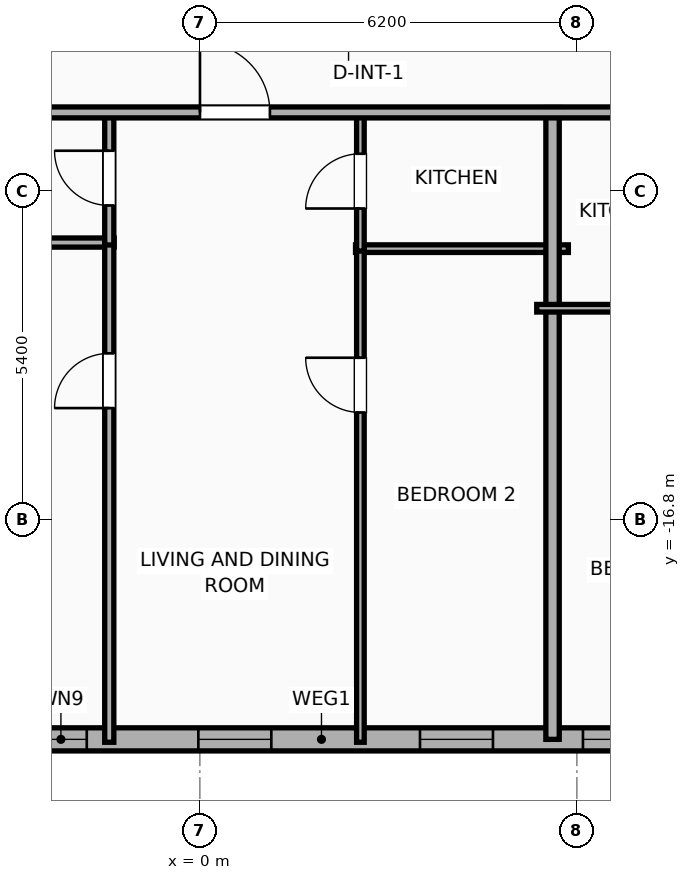
"""IFC4 building model, lengths in metres.
Left out: names, types, materials, properties, quantities, classifications, styles, units other than length and angle.
Written with IfcOpenShell. Run it as: python <this file> out.ifc"""

import sys

from ifc_helpers import new_model, si_unit, direction, frame, frame_2d, origin, place, context, subcontext, project, spatial, rectangle, extrude, element, fill, save


model = new_model("IFC4")
c1 = context("Model", 3, precision=1e-05, world=origin(), true_north=direction((0.0, 1.0)))
c2 = subcontext(c1, "Body", "Model", "MODEL_VIEW")
j1 = project(units=[si_unit("LENGTHUNIT", "METRE"), si_unit("PLANEANGLEUNIT", "RADIAN")], contexts=[c1])
p1 = place(None, origin())
s1 = spatial("IfcSite", under=j1, at=p1, CompositionType="ELEMENT")
p2 = place(p1, origin())
s2 = spatial("IfcBuilding", under=s1, at=p2, CompositionType="ELEMENT")
p3 = place(p2, frame((0.0, 0.0, 97.5)))
s3 = spatial("IfcBuildingStorey", under=s2, at=p3, CompositionType="ELEMENT", Elevation=97.5)
p4 = place(p3, frame((29.381, -20.41, 0.0), z_axis=(0.0, 0.0, 1.0), x_axis=(-1.0, 0.0, 0.0)))
e1 = element("IfcWall", 1, at=p4, inside=s3, PredefinedType="ELEMENTEDWALL", context=c2, shape_type="SweptSolid", body=[
    extrude(rectangle(XDim=54.763, YDim=0.38, at=frame_2d((27.381, 0.0))), origin(), (0.0, 0.0, 1.0), 3.65),
])
p5 = place(p4, frame((6.495, 0.0, 0.75)))
e2 = element("IfcOpeningElement", 2, at=p5, cuts=e1, PredefinedType="OPENING", context=c2, shape_type="SweptSolid", body=[
    extrude(rectangle(XDim=2.4, YDim=2.1, at=frame_2d((1.2, 1.05))), frame((0.0, 0.2, 0.0), z_axis=(0.0, -1.0, 0.0), x_axis=(1.0, 0.0, 0.0)), (0.0, 0.0, 1.0), 0.4),
])
p6 = place(p4, frame((17.686, 0.0, 0.75)))
e3 = element("IfcOpeningElement", 3, at=p6, cuts=e1, PredefinedType="OPENING", context=c2, shape_type="SweptSolid", body=[
    extrude(rectangle(XDim=2.4, YDim=2.1, at=frame_2d((1.2, 1.05))), frame((0.0, 0.2, 0.0), z_axis=(0.0, -1.0, 0.0), x_axis=(1.0, 0.0, 0.0)), (0.0, 0.0, 1.0), 0.4),
])
p7 = place(p4, frame((34.677, 0.0, 0.75)))
e4 = element("IfcOpeningElement", 4, at=p7, cuts=e1, PredefinedType="OPENING", context=c2, shape_type="SweptSolid", body=[
    extrude(rectangle(XDim=2.4, YDim=2.1, at=frame_2d((1.2, 1.05))), frame((0.0, 0.2, 0.0), z_axis=(0.0, -1.0, 0.0), x_axis=(1.0, 0.0, 0.0)), (0.0, 0.0, 1.0), 0.4),
])
p8 = place(p4, frame((45.867, 0.0, 0.75)))
e5 = element("IfcOpeningElement", 5, at=p8, cuts=e1, PredefinedType="OPENING", context=c2, shape_type="SweptSolid", body=[
    extrude(rectangle(XDim=2.4, YDim=2.1, at=frame_2d((1.2, 1.05))), frame((0.0, 0.2, 0.0), z_axis=(0.0, -1.0, 0.0), x_axis=(1.0, 0.0, 0.0)), (0.0, 0.0, 1.0), 0.4),
])
p9 = place(p4, frame((52.281, 0.0, 0.75)))
e6 = element("IfcOpeningElement", 6, at=p9, cuts=e1, PredefinedType="OPENING", context=c2, shape_type="SweptSolid", body=[
    extrude(rectangle(XDim=1.2, YDim=2.05, at=frame_2d((0.6, 1.025))), frame((0.0, 0.2, 0.0), z_axis=(0.0, -1.0, 0.0), x_axis=(1.0, 0.0, 0.0)), (0.0, 0.0, 1.0), 0.4),
])
p10 = place(p4, frame((49.641, 0.0, 0.75)))
e7 = element("IfcOpeningElement", 7, at=p10, cuts=e1, PredefinedType="OPENING", context=c2, shape_type="SweptSolid", body=[
    extrude(rectangle(XDim=1.2, YDim=2.05, at=frame_2d((0.6, 1.025))), frame((0.0, 0.2, 0.0), z_axis=(0.0, -1.0, 0.0), x_axis=(1.0, 0.0, 0.0)), (0.0, 0.0, 1.0), 0.4),
])
p11 = place(p4, frame((39.543, 0.0, 0.75)))
e8 = element("IfcOpeningElement", 8, at=p11, cuts=e1, PredefinedType="OPENING", context=c2, shape_type="SweptSolid", body=[
    extrude(rectangle(XDim=1.2, YDim=2.05, at=frame_2d((0.6, 1.025))), frame((0.0, 0.2, 0.0), z_axis=(0.0, -1.0, 0.0), x_axis=(1.0, 0.0, 0.0)), (0.0, 0.0, 1.0), 0.4),
])
p12 = place(p4, frame((44.538, 0.0, 0.75)))
e9 = element("IfcOpeningElement", 9, at=p12, cuts=e1, PredefinedType="OPENING", context=c2, shape_type="SweptSolid", body=[
    extrude(rectangle(XDim=0.52, YDim=2.05, at=frame_2d((0.26, 1.025))), frame((0.0, 0.2, 0.0), z_axis=(0.0, -1.0, 0.0), x_axis=(1.0, 0.0, 0.0)), (0.0, 0.0, 1.0), 0.4),
])
p13 = place(p4, frame((28.206, 0.0, 0.75)))
e10 = element("IfcOpeningElement", 10, at=p13, cuts=e1, PredefinedType="OPENING", context=c2, shape_type="SweptSolid", body=[
    extrude(rectangle(XDim=1.2, YDim=2.05, at=frame_2d((0.6, 1.025))), frame((0.0, 0.2, 0.0), z_axis=(0.0, -1.0, 0.0), x_axis=(1.0, 0.0, 0.0)), (0.0, 0.0, 1.0), 0.4),
])
p14 = place(p4, frame((31.241, 0.0, 0.75)))
e11 = element("IfcOpeningElement", 11, at=p14, cuts=e1, PredefinedType="OPENING", context=c2, shape_type="SweptSolid", body=[
    extrude(rectangle(XDim=0.85, YDim=2.05, at=frame_2d((0.425, 1.025))), frame((0.0, 0.2, 0.0), z_axis=(0.0, -1.0, 0.0), x_axis=(1.0, 0.0, 0.0)), (0.0, 0.0, 1.0), 0.4),
])
p15 = place(p4, frame((24.561, 0.0, 0.75)))
e12 = element("IfcOpeningElement", 12, at=p15, cuts=e1, PredefinedType="OPENING", context=c2, shape_type="SweptSolid", body=[
    extrude(rectangle(XDim=1.2, YDim=2.05, at=frame_2d((0.6, 1.025))), frame((0.0, 0.2, 0.0), z_axis=(0.0, -1.0, 0.0), x_axis=(1.0, 0.0, 0.0)), (0.0, 0.0, 1.0), 0.4),
])
p16 = place(p4, frame((22.561, 0.0, 0.75)))
e13 = element("IfcOpeningElement", 13, at=p16, cuts=e1, PredefinedType="OPENING", context=c2, shape_type="SweptSolid", body=[
    extrude(rectangle(XDim=0.52, YDim=2.05, at=frame_2d((0.26, 1.025))), frame((0.0, 0.2, 0.0), z_axis=(0.0, -1.0, 0.0), x_axis=(1.0, 0.0, 0.0)), (0.0, 0.0, 1.0), 0.4),
])
p17 = place(p4, frame((13.886, 0.0, 0.75)))
e14 = element("IfcOpeningElement", 14, at=p17, cuts=e1, PredefinedType="OPENING", context=c2, shape_type="SweptSolid", body=[
    extrude(rectangle(XDim=1.2, YDim=2.05, at=frame_2d((0.6, 1.025))), frame((0.0, 0.2, 0.0), z_axis=(0.0, -1.0, 0.0), x_axis=(1.0, 0.0, 0.0)), (0.0, 0.0, 1.0), 0.4),
])
p18 = place(p4, frame((11.694, 0.0, 0.75)))
e15 = element("IfcOpeningElement", 15, at=p18, cuts=e1, PredefinedType="OPENING", context=c2, shape_type="SweptSolid", body=[
    extrude(rectangle(XDim=0.85, YDim=2.05, at=frame_2d((0.425, 1.025))), frame((0.0, 0.2, 0.0), z_axis=(0.0, -1.0, 0.0), x_axis=(1.0, 0.0, 0.0)), (0.0, 0.0, 1.0), 0.4),
])
p19 = place(p4, frame((3.286, 0.0, 0.75)))
e16 = element("IfcOpeningElement", 16, at=p19, cuts=e1, PredefinedType="OPENING", context=c2, shape_type="SweptSolid", body=[
    extrude(rectangle(XDim=1.2, YDim=2.05, at=frame_2d((0.6, 1.025))), frame((0.0, 0.2, 0.0), z_axis=(0.0, -1.0, 0.0), x_axis=(1.0, 0.0, 0.0)), (0.0, 0.0, 1.0), 0.4),
])
p20 = place(p4, frame((0.816, 0.0, 0.75)))
e17 = element("IfcOpeningElement", 17, at=p20, cuts=e1, PredefinedType="OPENING", context=c2, shape_type="SweptSolid", body=[
    extrude(rectangle(XDim=1.2, YDim=2.05, at=frame_2d((0.6, 1.025))), frame((0.0, 0.2, 0.0), z_axis=(0.0, -1.0, 0.0), x_axis=(1.0, 0.0, 0.0)), (0.0, 0.0, 1.0), 0.4),
])
p21 = place(p3, frame((-5.26, -12.24, 0.0), z_axis=(0.0, 0.0, 1.0), x_axis=(1.0, 0.0, 0.0)))
e18 = element("IfcWall", 18, at=p21, inside=s3, PredefinedType="PLUMBINGWALL", context=c2, shape_type="SweptSolid", body=[
    extrude(rectangle(XDim=3.85, YDim=0.15, at=frame_2d((1.925, 0.0))), origin(), (0.0, 0.0, 1.0), 3.65),
])
p22 = place(p3, frame((2.56, -12.34, 0.0), z_axis=(0.0, 0.0, 1.0), x_axis=(1.0, 0.0, 0.0)))
e19 = element("IfcWall", 19, at=p22, inside=s3, PredefinedType="PARTITIONING", context=c2, shape_type="SweptSolid", body=[
    extrude(rectangle(XDim=3.5, YDim=0.125, at=frame_2d((1.75, 0.0))), origin(), (0.0, 0.0, 1.0), 3.65),
])
p23 = place(p3, frame((-1.49, -20.458, 0.0), z_axis=(0.0, 0.0, 1.0), x_axis=(0.0, 1.0, 0.0)))
e20 = element("IfcWall", 20, at=p23, inside=s3, PredefinedType="PLUMBINGWALL", context=c2, shape_type="SweptSolid", body=[
    extrude(rectangle(XDim=8.258, YDim=0.15, at=frame_2d((4.129, 0.0))), origin(), (0.0, 0.0, 1.0), 3.65),
])
p24 = place(p23, frame((5.496, 0.0, 0.0)))
e21 = element("IfcOpeningElement", 21, at=p24, cuts=e20, PredefinedType="OPENING", context=c2, shape_type="SweptSolid", body=[
    extrude(rectangle(XDim=0.9, YDim=2.05, at=frame_2d((0.45, 1.025))), frame((0.0, 0.085, 0.0), z_axis=(0.0, -1.0, 0.0), x_axis=(1.0, 0.0, 0.0)), (0.0, 0.0, 1.0), 0.17),
])
p25 = place(p3, frame((-1.49, -12.28, 0.0), z_axis=(0.0, 0.0, 1.0), x_axis=(0.0, 1.0, 0.0)))
e22 = element("IfcWall", 22, at=p25, inside=s3, PredefinedType="PLUMBINGWALL", context=c2, shape_type="SweptSolid", body=[
    extrude(rectangle(XDim=2.2, YDim=0.15, at=frame_2d((1.1, 0.0))), origin(), (0.0, 0.0, 1.0), 3.65),
])
p26 = place(p25, frame((0.65, 0.0, 0.0)))
e23 = element("IfcOpeningElement", 23, at=p26, cuts=e22, PredefinedType="OPENING", context=c2, shape_type="SweptSolid", body=[
    extrude(rectangle(XDim=0.9, YDim=2.05, at=frame_2d((0.45, 1.025))), frame((0.0, 0.085, 0.0), z_axis=(0.0, -1.0, 0.0), x_axis=(1.0, 0.0, 0.0)), (0.0, 0.0, 1.0), 0.17),
])
p27 = place(p3, frame((2.64, -20.458, 0.0), z_axis=(0.0, 0.0, 1.0), x_axis=(0.0, 1.0, 0.0)))
e24 = element("IfcWall", 24, at=p27, inside=s3, PredefinedType="PARTITIONING", context=c2, shape_type="SweptSolid", body=[
    extrude(rectangle(XDim=8.157, YDim=0.125, at=frame_2d((4.079, 0.0))), origin(), (0.0, 0.0, 1.0), 3.65),
])
p28 = place(p27, frame((5.424, 0.0, 0.0)))
e25 = element("IfcOpeningElement", 25, at=p28, cuts=e24, PredefinedType="OPENING", context=c2, shape_type="SweptSolid", body=[
    extrude(rectangle(XDim=0.9, YDim=2.05, at=frame_2d((0.45, 1.025))), frame((0.0, 0.073, 0.0), z_axis=(0.0, -1.0, 0.0), x_axis=(1.0, 0.0, 0.0)), (0.0, 0.0, 1.0), 0.145),
])
p29 = place(p3, frame((2.64, -12.38, 0.0), z_axis=(0.0, 0.0, 1.0), x_axis=(0.0, 1.0, 0.0)))
e26 = element("IfcWall", 26, at=p29, inside=s3, PredefinedType="PARTITIONING", context=c2, shape_type="SweptSolid", body=[
    extrude(rectangle(XDim=2.3, YDim=0.125, at=frame_2d((1.15, 0.0))), origin(), (0.0, 0.0, 1.0), 3.65),
])
p30 = place(p29, frame((0.7, 0.0, 0.0)))
e27 = element("IfcOpeningElement", 27, at=p30, cuts=e26, PredefinedType="OPENING", context=c2, shape_type="SweptSolid", body=[
    extrude(rectangle(XDim=0.9, YDim=2.05, at=frame_2d((0.45, 1.025))), frame((0.0, 0.073, 0.0), z_axis=(0.0, -1.0, 0.0), x_axis=(1.0, 0.0, 0.0)), (0.0, 0.0, 1.0), 0.145),
])
p31 = place(p3, frame((5.8, -20.41, 0.0), z_axis=(0.0, 0.0, 1.0), x_axis=(0.0, 1.0, 0.0)))
e28 = element("IfcWall", 28, at=p31, inside=s3, PredefinedType="PARTITIONING", context=c2, shape_type="SweptSolid", body=[
    extrude(rectangle(XDim=10.39, YDim=0.22, at=frame_2d((5.195, 0.0))), origin(), (0.0, 0.0, 1.0), 3.04),
])
p32 = place(p3, frame((5.54, -13.32, 0.0), z_axis=(0.0, 0.0, 1.0), x_axis=(1.0, 0.0, 0.0)))
e29 = element("IfcWall", 29, at=p32, inside=s3, PredefinedType="PARTITIONING", context=c2, shape_type="SweptSolid", body=[
    extrude(rectangle(XDim=3.58, YDim=0.125, at=frame_2d((1.79, 0.0))), origin(), (0.0, 0.0, 1.0), 3.65),
])
p33 = place(p3, frame((-29.21, -10.1, 0.0), z_axis=(0.0, 0.0, 1.0), x_axis=(1.0, 0.0, 0.0)))
e30 = element("IfcWall", 30, at=p33, inside=s3, PredefinedType="PARTITIONING", context=c2, shape_type="SweptSolid", body=[
    extrude(rectangle(XDim=62.42, YDim=0.18, at=frame_2d((31.21, 0.0))), origin(), (0.0, 0.0, 1.0), 3.65),
])
p34 = place(p33, frame((3.033, 0.0, 0.0)))
e31 = element("IfcOpeningElement", 31, at=p34, cuts=e30, PredefinedType="OPENING", context=c2, shape_type="SweptSolid", body=[
    extrude(rectangle(XDim=0.9, YDim=2.05, at=frame_2d((0.45, 1.025))), frame((0.0, 0.1, 0.0), z_axis=(0.0, -1.0, 0.0), x_axis=(1.0, 0.0, 0.0)), (0.0, 0.0, 1.0), 0.2),
])
p35 = place(p33, frame((9.768, 0.0, 0.0)))
e32 = element("IfcOpeningElement", 32, at=p35, cuts=e30, PredefinedType="OPENING", context=c2, shape_type="SweptSolid", body=[
    extrude(rectangle(XDim=0.9, YDim=2.05, at=frame_2d((0.45, 1.025))), frame((0.0, 0.1, 0.0), z_axis=(0.0, -1.0, 0.0), x_axis=(1.0, 0.0, 0.0)), (0.0, 0.0, 1.0), 0.2),
])
p36 = place(p33, frame((18.65, 0.0, 0.0)))
e33 = element("IfcOpeningElement", 33, at=p36, cuts=e30, PredefinedType="OPENING", context=c2, shape_type="SweptSolid", body=[
    extrude(rectangle(XDim=1.15, YDim=2.05, at=frame_2d((0.575, 1.025))), frame((0.0, 0.1, 0.0), z_axis=(0.0, -1.0, 0.0), x_axis=(1.0, 0.0, 0.0)), (0.0, 0.0, 1.0), 0.2),
])
p37 = place(p33, frame((29.212, 0.0, 0.0)))
e34 = element("IfcOpeningElement", 34, at=p37, cuts=e30, PredefinedType="OPENING", context=c2, shape_type="SweptSolid", body=[
    extrude(rectangle(XDim=1.15, YDim=2.05, at=frame_2d((0.575, 1.025))), frame((0.0, 0.1, 0.0), z_axis=(0.0, -1.0, 0.0), x_axis=(1.0, 0.0, 0.0)), (0.0, 0.0, 1.0), 0.2),
])
p38 = place(p33, frame((40.379, 0.0, 0.0)))
e35 = element("IfcOpeningElement", 35, at=p38, cuts=e30, PredefinedType="OPENING", context=c2, shape_type="SweptSolid", body=[
    extrude(rectangle(XDim=1.15, YDim=2.05, at=frame_2d((0.575, 1.025))), frame((0.0, 0.1, 0.0), z_axis=(0.0, -1.0, 0.0), x_axis=(1.0, 0.0, 0.0)), (0.0, 0.0, 1.0), 0.2),
])
p39 = place(p33, frame((50.959, 0.0, 0.0)))
e36 = element("IfcOpeningElement", 36, at=p39, cuts=e30, PredefinedType="OPENING", context=c2, shape_type="SweptSolid", body=[
    extrude(rectangle(XDim=1.15, YDim=2.05, at=frame_2d((0.575, 1.025))), frame((0.0, 0.1, 0.0), z_axis=(0.0, -1.0, 0.0), x_axis=(1.0, 0.0, 0.0)), (0.0, 0.0, 1.0), 0.2),
])
p40 = place(p33, frame((59.117, 0.0, 0.0)))
e37 = element("IfcOpeningElement", 37, at=p40, cuts=e30, PredefinedType="OPENING", context=c2, shape_type="SweptSolid", body=[
    extrude(rectangle(XDim=0.9, YDim=2.05, at=frame_2d((0.45, 1.025))), frame((0.0, 0.1, 0.0), z_axis=(0.0, -1.0, 0.0), x_axis=(1.0, 0.0, 0.0)), (0.0, 0.0, 1.0), 0.2),
])
p41 = place(p13, origin())
e38 = element("IfcWindow", 38, at=p41, inside=s3, PartitioningType="SINGLE_PANEL", PredefinedType="WINDOW", context=c2, shape_type="SweptSolid", body=[
    extrude(rectangle(XDim=1.2, YDim=2.05, at=frame_2d((0.6, 1.025))), frame((0.0, 0.03, 0.0), z_axis=(0.0, -1.0, 0.0), x_axis=(1.0, 0.0, 0.0)), (0.0, 0.0, 1.0), 0.06),
])
fill(e10, e38)
p42 = place(p14, origin())
e39 = element("IfcWindow", 39, at=p42, inside=s3, PartitioningType="SINGLE_PANEL", PredefinedType="WINDOW", context=c2, shape_type="SweptSolid", body=[
    extrude(rectangle(XDim=0.85, YDim=2.05, at=frame_2d((0.425, 1.025))), frame((0.0, 0.03, 0.0), z_axis=(0.0, -1.0, 0.0), x_axis=(1.0, 0.0, 0.0)), (0.0, 0.0, 1.0), 0.06),
])
fill(e11, e39)
p43 = place(p15, origin())
e40 = element("IfcWindow", 40, at=p43, inside=s3, PartitioningType="SINGLE_PANEL", PredefinedType="WINDOW", context=c2, shape_type="SweptSolid", body=[
    extrude(rectangle(XDim=1.2, YDim=2.05, at=frame_2d((0.6, 1.025))), frame((0.0, 0.03, 0.0), z_axis=(0.0, -1.0, 0.0), x_axis=(1.0, 0.0, 0.0)), (0.0, 0.0, 1.0), 0.06),
])
fill(e12, e40)
p44 = place(p16, origin())
e41 = element("IfcWindow", 41, at=p44, inside=s3, PartitioningType="SINGLE_PANEL", PredefinedType="WINDOW", context=c2, shape_type="SweptSolid", body=[
    extrude(rectangle(XDim=0.52, YDim=2.05, at=frame_2d((0.26, 1.025))), frame((0.0, 0.03, 0.0), z_axis=(0.0, -1.0, 0.0), x_axis=(1.0, 0.0, 0.0)), (0.0, 0.0, 1.0), 0.06),
])
fill(e13, e41)
p45 = place(p24, origin())
e42 = element("IfcDoor", 42, at=p45, inside=s3, OperationType="SINGLE_SWING_LEFT", PredefinedType="DOOR", context=c2, shape_type="SweptSolid", body=[
    extrude(rectangle(XDim=0.9, YDim=2.05, at=frame_2d((0.45, 1.025))), frame((0.0, 0.025, 0.0), z_axis=(0.0, -1.0, 0.0), x_axis=(1.0, 0.0, 0.0)), (0.0, 0.0, 1.0), 0.05),
])
fill(e21, e42)
p46 = place(p26, origin())
e43 = element("IfcDoor", 43, at=p46, inside=s3, OperationType="SINGLE_SWING_RIGHT", PredefinedType="DOOR", context=c2, shape_type="SweptSolid", body=[
    extrude(rectangle(XDim=0.9, YDim=2.05, at=frame_2d((0.45, 1.025))), frame((0.0, 0.025, 0.0), z_axis=(0.0, -1.0, 0.0), x_axis=(1.0, 0.0, 0.0)), (0.0, 0.0, 1.0), 0.05),
])
fill(e23, e43)
p47 = place(p28, origin())
e44 = element("IfcDoor", 44, at=p47, inside=s3, OperationType="SINGLE_SWING_RIGHT", PredefinedType="DOOR", context=c2, shape_type="SweptSolid", body=[
    extrude(rectangle(XDim=0.9, YDim=2.05, at=frame_2d((0.45, 1.025))), frame((0.0, 0.025, 0.0), z_axis=(0.0, -1.0, 0.0), x_axis=(1.0, 0.0, 0.0)), (0.0, 0.0, 1.0), 0.05),
])
fill(e25, e44)
p48 = place(p30, origin())
e45 = element("IfcDoor", 45, at=p48, inside=s3, OperationType="SINGLE_SWING_LEFT", PredefinedType="DOOR", context=c2, shape_type="SweptSolid", body=[
    extrude(rectangle(XDim=0.9, YDim=2.05, at=frame_2d((0.45, 1.025))), frame((0.0, 0.025, 0.0), z_axis=(0.0, -1.0, 0.0), x_axis=(1.0, 0.0, 0.0)), (0.0, 0.0, 1.0), 0.05),
])
fill(e27, e45)
p49 = place(p37, origin())
e46 = element("IfcDoor", 46, at=p49, inside=s3, OperationType="SINGLE_SWING_LEFT", PredefinedType="DOOR", context=c2, shape_type="SweptSolid", body=[
    extrude(rectangle(XDim=1.15, YDim=2.05, at=frame_2d((0.575, 1.025))), frame((0.0, 0.025, 0.0), z_axis=(0.0, -1.0, 0.0), x_axis=(1.0, 0.0, 0.0)), (0.0, 0.0, 1.0), 0.05),
])
fill(e34, e46)
save(model, sys.argv[1])
